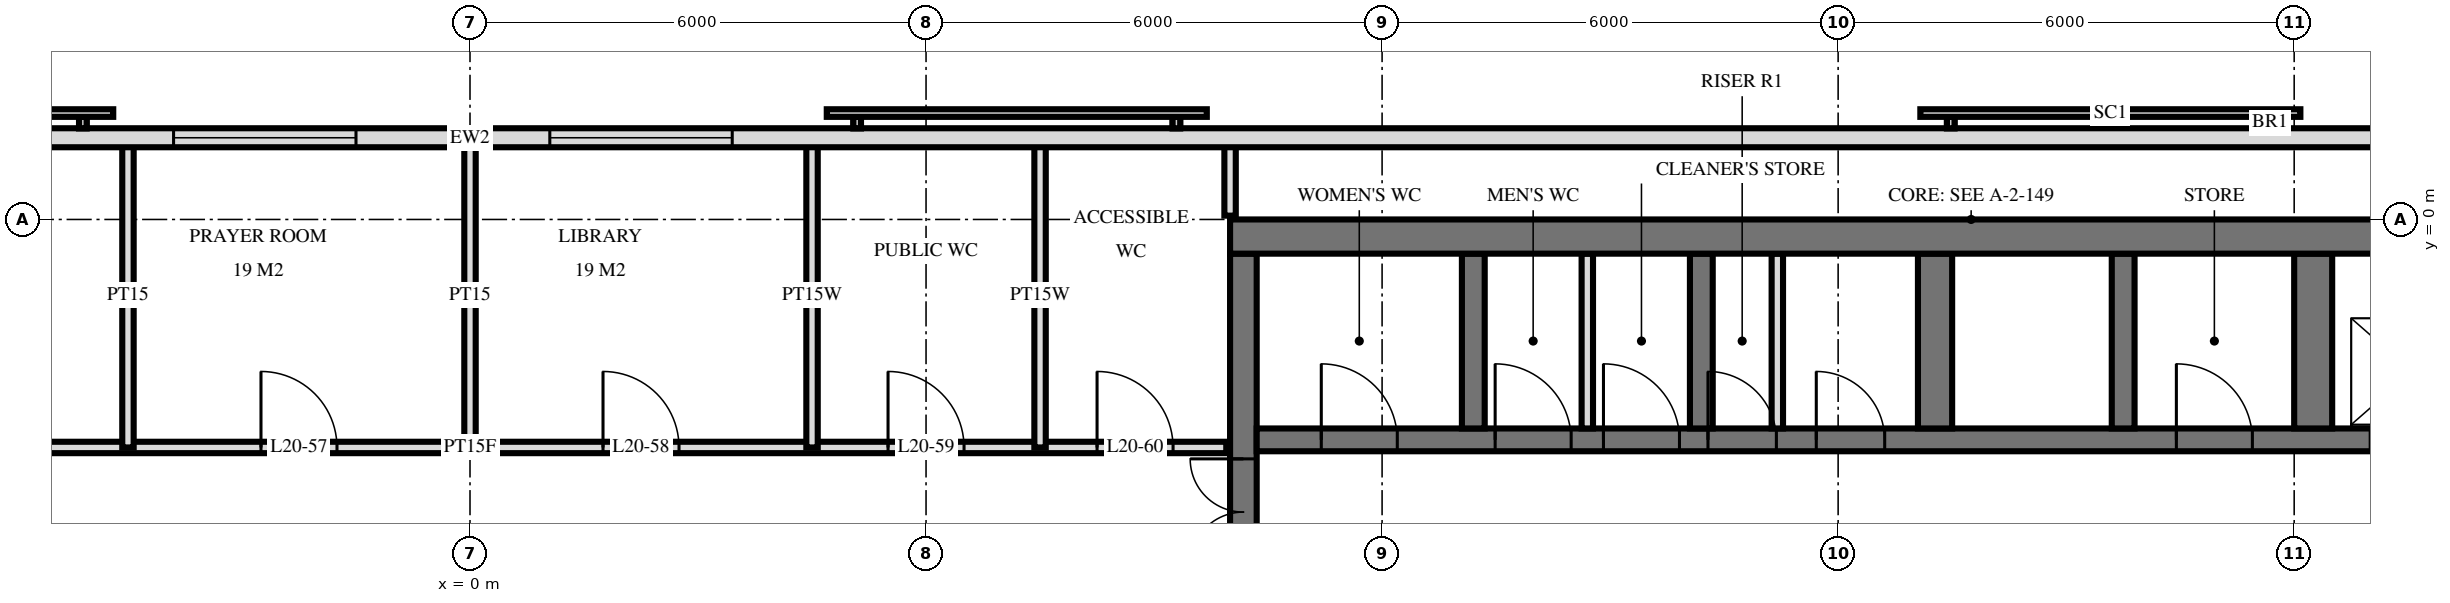
"""IFC4 building model, lengths in metres.
Left out: names, types, materials, properties, quantities, classifications, styles, units other than length and angle.
Written with IfcOpenShell. Run it as: python <this file> out.ifc"""

import sys

from ifc_helpers import new_model, si_unit, direction, frame, frame_2d, origin, place, context, subcontext, project, spatial, rectangle, extrude, element, fill, save


model = new_model("IFC4")
c1 = context("Model", 3, precision=1e-05, world=origin(), true_north=direction((0.0, 1.0)))
c2 = subcontext(c1, "Body", "Model", "MODEL_VIEW")
j1 = project(units=[si_unit("LENGTHUNIT", "METRE"), si_unit("PLANEANGLEUNIT", "RADIAN")], contexts=[c1])
p1 = place(None, origin())
s1 = spatial("IfcSite", under=j1, at=p1, CompositionType="ELEMENT")
p2 = place(p1, origin())
s2 = spatial("IfcBuilding", under=s1, at=p2, CompositionType="ELEMENT")
p3 = place(p2, frame((0.0, 0.0, 81.6)))
s3 = spatial("IfcBuildingStorey", under=s2, at=p3, CompositionType="ELEMENT", Elevation=81.6)
p4 = place(p3, frame((10.0, -0.225, 0.0), z_axis=(0.0, 0.0, 1.0), x_axis=(1.0, 0.0, 0.0)))
e1 = element("IfcWall", 1, at=p4, inside=s3, PredefinedType="SHEAR", context=c2, shape_type="SweptSolid", body=[
    extrude(rectangle(XDim=19.5, YDim=0.45, at=frame_2d((9.75, 0.0))), origin(), (0.0, 0.0, 1.0), 3.6),
])
p5 = place(p3, frame((10.175, -14.55, 0.0), z_axis=(0.0, 0.0, 1.0), x_axis=(0.0, 1.0, 0.0)))
e2 = element("IfcWall", 2, at=p5, inside=s3, PredefinedType="SHEAR", context=c2, shape_type="SweptSolid", body=[
    extrude(rectangle(XDim=14.1, YDim=0.35, at=frame_2d((7.05, 0.0))), origin(), (0.0, 0.0, 1.0), 3.6),
])
p6 = place(p5, frame((8.4, 0.0, 0.0)))
e3 = element("IfcOpeningElement", 3, at=p6, cuts=e2, PredefinedType="OPENING", context=c2, shape_type="SweptSolid", body=[
    extrude(rectangle(XDim=1.4, YDim=2.4, at=frame_2d((0.7, 1.2))), frame((0.0, 0.185, 0.0), z_axis=(0.0, -1.0, 0.0), x_axis=(1.0, 0.0, 0.0)), (0.0, 0.0, 1.0), 0.37),
])
p7 = place(p5, frame((10.0, 0.0, 0.0)))
e4 = element("IfcOpeningElement", 4, at=p7, cuts=e2, PredefinedType="OPENING", context=c2, shape_type="SweptSolid", body=[
    extrude(rectangle(XDim=1.4, YDim=2.4, at=frame_2d((0.7, 1.2))), frame((0.0, 0.185, 0.0), z_axis=(0.0, -1.0, 0.0), x_axis=(1.0, 0.0, 0.0)), (0.0, 0.0, 1.0), 0.37),
])
p8 = place(p5, frame((4.0, 0.0, 0.0)))
e5 = element("IfcOpeningElement", 5, at=p8, cuts=e2, PredefinedType="OPENING", context=c2, shape_type="SweptSolid", body=[
    extrude(rectangle(XDim=1.2, YDim=2.1, at=frame_2d((0.6, 1.05))), frame((0.0, 0.185, 0.0), z_axis=(0.0, -1.0, 0.0), x_axis=(1.0, 0.0, 0.0)), (0.0, 0.0, 1.0), 0.37),
])
p9 = place(p3, frame((10.35, -2.9, 0.0), z_axis=(0.0, 0.0, 1.0), x_axis=(1.0, 0.0, 0.0)))
e6 = element("IfcWall", 6, at=p9, inside=s3, PredefinedType="SHEAR", context=c2, shape_type="SweptSolid", body=[
    extrude(rectangle(XDim=18.7, YDim=0.3, at=frame_2d((9.35, 0.0))), origin(), (0.0, 0.0, 1.0), 3.6),
])
p10 = place(p9, frame((14.65, 0.0, 0.0)))
e7 = element("IfcOpeningElement", 7, at=p10, cuts=e6, PredefinedType="OPENING", context=c2, shape_type="SweptSolid", body=[
    extrude(rectangle(XDim=1.1, YDim=2.1, at=frame_2d((0.55, 1.05))), frame((0.0, 0.16, 0.0), z_axis=(0.0, -1.0, 0.0), x_axis=(1.0, 0.0, 0.0)), (0.0, 0.0, 1.0), 0.32),
])
p11 = place(p9, frame((17.05, 0.0, 0.0)))
e8 = element("IfcOpeningElement", 8, at=p11, cuts=e6, PredefinedType="OPENING", context=c2, shape_type="SweptSolid", body=[
    extrude(rectangle(XDim=1.1, YDim=2.1, at=frame_2d((0.55, 1.05))), frame((0.0, 0.16, 0.0), z_axis=(0.0, -1.0, 0.0), x_axis=(1.0, 0.0, 0.0)), (0.0, 0.0, 1.0), 0.32),
])
p12 = place(p9, frame((5.938, 0.0, 0.0)))
e9 = element("IfcOpeningElement", 9, at=p12, cuts=e6, PredefinedType="OPENING", context=c2, shape_type="SweptSolid", body=[
    extrude(rectangle(XDim=0.9, YDim=2.1, at=frame_2d((0.45, 1.05))), frame((0.0, 0.16, 0.0), z_axis=(0.0, -1.0, 0.0), x_axis=(1.0, 0.0, 0.0)), (0.0, 0.0, 1.0), 0.32),
])
p13 = place(p9, frame((7.363, 0.0, 0.0)))
e10 = element("IfcOpeningElement", 10, at=p13, cuts=e6, PredefinedType="OPENING", context=c2, shape_type="SweptSolid", body=[
    extrude(rectangle(XDim=0.9, YDim=2.1, at=frame_2d((0.45, 1.05))), frame((0.0, 0.16, 0.0), z_axis=(0.0, -1.0, 0.0), x_axis=(1.0, 0.0, 0.0)), (0.0, 0.0, 1.0), 0.32),
])
p14 = place(p9, frame((0.85, 0.0, 0.0)))
e11 = element("IfcOpeningElement", 11, at=p14, cuts=e6, PredefinedType="OPENING", context=c2, shape_type="SweptSolid", body=[
    extrude(rectangle(XDim=1.0, YDim=2.1, at=frame_2d((0.5, 1.05))), frame((0.0, 0.16, 0.0), z_axis=(0.0, -1.0, 0.0), x_axis=(1.0, 0.0, 0.0)), (0.0, 0.0, 1.0), 0.32),
])
p15 = place(p9, frame((3.137, 0.0, 0.0)))
e12 = element("IfcOpeningElement", 12, at=p15, cuts=e6, PredefinedType="OPENING", context=c2, shape_type="SweptSolid", body=[
    extrude(rectangle(XDim=1.0, YDim=2.1, at=frame_2d((0.5, 1.05))), frame((0.0, 0.16, 0.0), z_axis=(0.0, -1.0, 0.0), x_axis=(1.0, 0.0, 0.0)), (0.0, 0.0, 1.0), 0.32),
])
p16 = place(p9, frame((4.562, 0.0, 0.0)))
e13 = element("IfcOpeningElement", 13, at=p16, cuts=e6, PredefinedType="OPENING", context=c2, shape_type="SweptSolid", body=[
    extrude(rectangle(XDim=1.0, YDim=2.1, at=frame_2d((0.5, 1.05))), frame((0.0, 0.16, 0.0), z_axis=(0.0, -1.0, 0.0), x_axis=(1.0, 0.0, 0.0)), (0.0, 0.0, 1.0), 0.32),
])
p17 = place(p9, frame((12.1, 0.0, 0.0)))
e14 = element("IfcOpeningElement", 14, at=p17, cuts=e6, PredefinedType="OPENING", context=c2, shape_type="SweptSolid", body=[
    extrude(rectangle(XDim=1.0, YDim=2.1, at=frame_2d((0.5, 1.05))), frame((0.0, 0.16, 0.0), z_axis=(0.0, -1.0, 0.0), x_axis=(1.0, 0.0, 0.0)), (0.0, 0.0, 1.0), 0.32),
])
for number, where, z_axis, x_axis in (
    (15, (13.2, -2.75, 0.0), (0.0, 0.0, 1.0), (0.0, 1.0, 0.0)),
    (16, (16.2, -2.75, 0.0), (0.0, 0.0, 1.0), (0.0, 1.0, 0.0)),
):
    element("IfcWall", number, at=place(p3, frame(where, z_axis=z_axis, x_axis=x_axis)), inside=s3, PredefinedType="SHEAR", context=c2, shape_type="SweptSolid", body=[
        extrude(rectangle(XDim=2.3, YDim=0.3, at=frame_2d((1.15, 0.0))), origin(), (0.0, 0.0, 1.0), 3.6),
    ])
p18 = place(p3, frame((19.275, -2.75, 0.0), z_axis=(0.0, 0.0, 1.0), x_axis=(0.0, 1.0, 0.0)))
e17 = element("IfcWall", 17, at=p18, inside=s3, PredefinedType="SHEAR", context=c2, shape_type="SweptSolid", body=[
    extrude(rectangle(XDim=2.3, YDim=0.45, at=frame_2d((1.15, 0.0))), origin(), (0.0, 0.0, 1.0), 3.6),
])
p19 = place(p3, frame((21.75, -2.75, 0.0), z_axis=(0.0, 0.0, 1.0), x_axis=(0.0, 1.0, 0.0)))
e18 = element("IfcWall", 18, at=p19, inside=s3, PredefinedType="SHEAR", context=c2, shape_type="SweptSolid", body=[
    extrude(rectangle(XDim=2.3, YDim=0.3, at=frame_2d((1.15, 0.0))), origin(), (0.0, 0.0, 1.0), 3.6),
])
p20 = place(p3, frame((24.25, -2.75, 0.0), z_axis=(0.0, 0.0, 1.0), x_axis=(0.0, 1.0, 0.0)))
e19 = element("IfcWall", 19, at=p20, inside=s3, PredefinedType="SHEAR", context=c2, shape_type="SweptSolid", body=[
    extrude(rectangle(XDim=2.3, YDim=0.5, at=frame_2d((1.15, 0.0))), origin(), (0.0, 0.0, 1.0), 3.6),
])
p21 = place(p3, frame((28.775, 1.075, 0.0), z_axis=(0.0, 0.0, 1.0), x_axis=(-1.0, 0.0, 0.0)))
e20 = element("IfcWall", 20, at=p21, inside=s3, PredefinedType="SOLIDWALL", context=c2, shape_type="SweptSolid", body=[
    extrude(rectangle(XDim=57.551, YDim=0.25, at=frame_2d((28.775, 0.0))), origin(), (0.0, 0.0, 1.0), 3.32),
])
p22 = place(p21, frame((25.325, 0.0, 0.3)))
e21 = element("IfcOpeningElement", 21, at=p22, cuts=e20, PredefinedType="OPENING", context=c2, shape_type="SweptSolid", body=[
    extrude(rectangle(XDim=2.4, YDim=2.1, at=frame_2d((1.2, 1.05))), frame((0.0, 0.135, 0.0), z_axis=(0.0, -1.0, 0.0), x_axis=(1.0, 0.0, 0.0)), (0.0, 0.0, 1.0), 0.27),
])
p23 = place(p21, frame((30.275, 0.0, 0.3)))
e22 = element("IfcOpeningElement", 22, at=p23, cuts=e20, PredefinedType="OPENING", context=c2, shape_type="SweptSolid", body=[
    extrude(rectangle(XDim=2.4, YDim=2.1, at=frame_2d((1.2, 1.05))), frame((0.0, 0.135, 0.0), z_axis=(0.0, -1.0, 0.0), x_axis=(1.0, 0.0, 0.0)), (0.0, 0.0, 1.0), 0.27),
])
p24 = place(p21, frame((34.825, 0.0, 0.3)))
e23 = element("IfcOpeningElement", 23, at=p24, cuts=e20, PredefinedType="OPENING", context=c2, shape_type="SweptSolid", body=[
    extrude(rectangle(XDim=2.4, YDim=2.1, at=frame_2d((1.2, 1.05))), frame((0.0, 0.135, 0.0), z_axis=(0.0, -1.0, 0.0), x_axis=(1.0, 0.0, 0.0)), (0.0, 0.0, 1.0), 0.27),
])
for number, where, z_axis, x_axis in (
    (24, (17.2, -2.75, 0.0), (0.0, 0.0, 1.0), (0.0, 1.0, 0.0)),
    (25, (14.7, -2.75, 0.0), (0.0, 0.0, 1.0), (0.0, 1.0, 0.0)),
):
    element("IfcWall", number, at=place(p3, frame(where, z_axis=z_axis, x_axis=x_axis)), inside=s3, PredefinedType="PARTITIONING", context=c2, shape_type="SweptSolid", body=[
        extrude(rectangle(XDim=2.3, YDim=0.15, at=frame_2d((1.15, 0.0))), origin(), (0.0, 0.0, 1.0), 3.3),
    ])
p25 = place(p3, frame((10.0, 0.05, 0.0), z_axis=(0.0, 0.0, 1.0), x_axis=(0.0, 1.0, 0.0)))
e26 = element("IfcWall", 26, at=p25, inside=s3, PredefinedType="PLUMBINGWALL", context=c2, shape_type="SweptSolid", body=[
    extrude(rectangle(XDim=0.97, YDim=0.15, at=frame_2d((0.485, 0.0))), origin(), (0.0, 0.0, 1.0), 3.32),
])
for number, where, z_axis, x_axis in (
    (27, (7.5, -3.0, 0.0), (0.0, 0.0, 1.0), (0.0, 1.0, 0.0)),
    (28, (4.5, -3.0, 0.0), (0.0, 0.0, 1.0), (0.0, 1.0, 0.0)),
):
    element("IfcWall", number, at=place(p3, frame(where, z_axis=z_axis, x_axis=x_axis)), inside=s3, PredefinedType="PLUMBINGWALL", context=c2, shape_type="SweptSolid", body=[
        extrude(rectangle(XDim=4.02, YDim=0.15, at=frame_2d((2.01, 0.0))), origin(), (0.0, 0.0, 1.0), 3.32),
    ])
for number, where, z_axis, x_axis in (
    (29, (0.0, -3.0, 0.0), (0.0, 0.0, 1.0), (0.0, 1.0, 0.0)),
    (30, (-4.5, -3.0, 0.0), (0.0, 0.0, 1.0), (0.0, 1.0, 0.0)),
):
    element("IfcWall", number, at=place(p3, frame(where, z_axis=z_axis, x_axis=x_axis)), inside=s3, PredefinedType="PARTITIONING", context=c2, shape_type="SweptSolid", body=[
        extrude(rectangle(XDim=4.02, YDim=0.15, at=frame_2d((2.01, 0.0))), origin(), (0.0, 0.0, 1.0), 3.32),
    ])
p26 = place(p3, frame((-9.95, -3.0, 0.0), z_axis=(0.0, 0.0, 1.0), x_axis=(1.0, 0.0, 0.0)))
e31 = element("IfcWall", 31, at=p26, inside=s3, PredefinedType="PARTITIONING", context=c2, shape_type="SweptSolid", body=[
    extrude(rectangle(XDim=19.9, YDim=0.15, at=frame_2d((9.95, 0.0))), origin(), (0.0, 0.0, 1.0), 3.32),
])
p27 = place(p26, frame((2.2, 0.0, 0.0)))
e32 = element("IfcOpeningElement", 32, at=p27, cuts=e31, PredefinedType="OPENING", context=c2, shape_type="SweptSolid", body=[
    extrude(rectangle(XDim=1.0, YDim=2.1, at=frame_2d((0.5, 1.05))), frame((0.0, 0.085, 0.0), z_axis=(0.0, -1.0, 0.0), x_axis=(1.0, 0.0, 0.0)), (0.0, 0.0, 1.0), 0.17),
])
p28 = place(p26, frame((7.2, 0.0, 0.0)))
e33 = element("IfcOpeningElement", 33, at=p28, cuts=e31, PredefinedType="OPENING", context=c2, shape_type="SweptSolid", body=[
    extrude(rectangle(XDim=1.0, YDim=2.1, at=frame_2d((0.5, 1.05))), frame((0.0, 0.085, 0.0), z_axis=(0.0, -1.0, 0.0), x_axis=(1.0, 0.0, 0.0)), (0.0, 0.0, 1.0), 0.17),
])
p29 = place(p26, frame((11.7, 0.0, 0.0)))
e34 = element("IfcOpeningElement", 34, at=p29, cuts=e31, PredefinedType="OPENING", context=c2, shape_type="SweptSolid", body=[
    extrude(rectangle(XDim=1.0, YDim=2.1, at=frame_2d((0.5, 1.05))), frame((0.0, 0.085, 0.0), z_axis=(0.0, -1.0, 0.0), x_axis=(1.0, 0.0, 0.0)), (0.0, 0.0, 1.0), 0.17),
])
p30 = place(p26, frame((15.45, 0.0, 0.0)))
e35 = element("IfcOpeningElement", 35, at=p30, cuts=e31, PredefinedType="OPENING", context=c2, shape_type="SweptSolid", body=[
    extrude(rectangle(XDim=1.0, YDim=2.1, at=frame_2d((0.5, 1.05))), frame((0.0, 0.085, 0.0), z_axis=(0.0, -1.0, 0.0), x_axis=(1.0, 0.0, 0.0)), (0.0, 0.0, 1.0), 0.17),
])
p31 = place(p26, frame((18.2, 0.0, 0.0)))
e36 = element("IfcOpeningElement", 36, at=p31, cuts=e31, PredefinedType="OPENING", context=c2, shape_type="SweptSolid", body=[
    extrude(rectangle(XDim=1.0, YDim=2.1, at=frame_2d((0.5, 1.05))), frame((0.0, 0.085, 0.0), z_axis=(0.0, -1.0, 0.0), x_axis=(1.0, 0.0, 0.0)), (0.0, 0.0, 1.0), 0.17),
])
p32 = place(p22, origin())
e37 = element("IfcWindow", 37, at=p32, inside=s3, PartitioningType="SINGLE_PANEL", PredefinedType="WINDOW", context=c2, shape_type="SweptSolid", body=[
    extrude(rectangle(XDim=2.4, YDim=2.1, at=frame_2d((1.2, 1.05))), frame((0.0, 0.03, 0.0), z_axis=(0.0, -1.0, 0.0), x_axis=(1.0, 0.0, 0.0)), (0.0, 0.0, 1.0), 0.06),
])
fill(e21, e37)
p33 = place(p23, origin())
e38 = element("IfcWindow", 38, at=p33, inside=s3, PartitioningType="SINGLE_PANEL", PredefinedType="WINDOW", context=c2, shape_type="SweptSolid", body=[
    extrude(rectangle(XDim=2.4, YDim=2.1, at=frame_2d((1.2, 1.05))), frame((0.0, 0.03, 0.0), z_axis=(0.0, -1.0, 0.0), x_axis=(1.0, 0.0, 0.0)), (0.0, 0.0, 1.0), 0.06),
])
fill(e22, e38)
p34 = place(p7, origin())
e39 = element("IfcDoor", 39, at=p34, inside=s3, OperationType="DOUBLE_DOOR_SINGLE_SWING", PredefinedType="DOOR", context=c2, shape_type="SweptSolid", body=[
    extrude(rectangle(XDim=1.4, YDim=2.4, at=frame_2d((0.7, 1.2))), frame((0.0, 0.025, 0.0), z_axis=(0.0, -1.0, 0.0), x_axis=(1.0, 0.0, 0.0)), (0.0, 0.0, 1.0), 0.05),
])
fill(e4, e39)
p35 = place(p12, origin())
e40 = element("IfcDoor", 40, at=p35, inside=s3, OperationType="SINGLE_SWING_RIGHT", PredefinedType="DOOR", context=c2, shape_type="SweptSolid", body=[
    extrude(rectangle(XDim=0.9, YDim=2.1, at=frame_2d((0.45, 1.05))), frame((0.0, 0.025, 0.0), z_axis=(0.0, -1.0, 0.0), x_axis=(1.0, 0.0, 0.0)), (0.0, 0.0, 1.0), 0.05),
])
fill(e9, e40)
p36 = place(p13, origin())
e41 = element("IfcDoor", 41, at=p36, inside=s3, OperationType="SINGLE_SWING_RIGHT", PredefinedType="DOOR", context=c2, shape_type="SweptSolid", body=[
    extrude(rectangle(XDim=0.9, YDim=2.1, at=frame_2d((0.45, 1.05))), frame((0.0, 0.025, 0.0), z_axis=(0.0, -1.0, 0.0), x_axis=(1.0, 0.0, 0.0)), (0.0, 0.0, 1.0), 0.05),
])
fill(e10, e41)
p37 = place(p14, origin())
e42 = element("IfcDoor", 42, at=p37, inside=s3, OperationType="SINGLE_SWING_RIGHT", PredefinedType="DOOR", context=c2, shape_type="SweptSolid", body=[
    extrude(rectangle(XDim=1.0, YDim=2.1, at=frame_2d((0.5, 1.05))), frame((0.0, 0.025, 0.0), z_axis=(0.0, -1.0, 0.0), x_axis=(1.0, 0.0, 0.0)), (0.0, 0.0, 1.0), 0.05),
])
fill(e11, e42)
p38 = place(p15, origin())
e43 = element("IfcDoor", 43, at=p38, inside=s3, OperationType="SINGLE_SWING_RIGHT", PredefinedType="DOOR", context=c2, shape_type="SweptSolid", body=[
    extrude(rectangle(XDim=1.0, YDim=2.1, at=frame_2d((0.5, 1.05))), frame((0.0, 0.025, 0.0), z_axis=(0.0, -1.0, 0.0), x_axis=(1.0, 0.0, 0.0)), (0.0, 0.0, 1.0), 0.05),
])
fill(e12, e43)
p39 = place(p16, origin())
e44 = element("IfcDoor", 44, at=p39, inside=s3, OperationType="SINGLE_SWING_RIGHT", PredefinedType="DOOR", context=c2, shape_type="SweptSolid", body=[
    extrude(rectangle(XDim=1.0, YDim=2.1, at=frame_2d((0.5, 1.05))), frame((0.0, 0.025, 0.0), z_axis=(0.0, -1.0, 0.0), x_axis=(1.0, 0.0, 0.0)), (0.0, 0.0, 1.0), 0.05),
])
fill(e13, e44)
p40 = place(p17, origin())
e45 = element("IfcDoor", 45, at=p40, inside=s3, OperationType="SINGLE_SWING_RIGHT", PredefinedType="DOOR", context=c2, shape_type="SweptSolid", body=[
    extrude(rectangle(XDim=1.0, YDim=2.1, at=frame_2d((0.5, 1.05))), frame((0.0, 0.025, 0.0), z_axis=(0.0, -1.0, 0.0), x_axis=(1.0, 0.0, 0.0)), (0.0, 0.0, 1.0), 0.05),
])
fill(e14, e45)
p41 = place(p28, origin())
e46 = element("IfcDoor", 46, at=p41, inside=s3, OperationType="SINGLE_SWING_RIGHT", PredefinedType="DOOR", context=c2, shape_type="SweptSolid", body=[
    extrude(rectangle(XDim=1.0, YDim=2.1, at=frame_2d((0.5, 1.05))), frame((0.0, 0.025, 0.0), z_axis=(0.0, -1.0, 0.0), x_axis=(1.0, 0.0, 0.0)), (0.0, 0.0, 1.0), 0.05),
])
fill(e33, e46)
p42 = place(p29, origin())
e47 = element("IfcDoor", 47, at=p42, inside=s3, OperationType="SINGLE_SWING_RIGHT", PredefinedType="DOOR", context=c2, shape_type="SweptSolid", body=[
    extrude(rectangle(XDim=1.0, YDim=2.1, at=frame_2d((0.5, 1.05))), frame((0.0, 0.025, 0.0), z_axis=(0.0, -1.0, 0.0), x_axis=(1.0, 0.0, 0.0)), (0.0, 0.0, 1.0), 0.05),
])
fill(e34, e47)
p43 = place(p30, origin())
e48 = element("IfcDoor", 48, at=p43, inside=s3, OperationType="SINGLE_SWING_RIGHT", PredefinedType="DOOR", context=c2, shape_type="SweptSolid", body=[
    extrude(rectangle(XDim=1.0, YDim=2.1, at=frame_2d((0.5, 1.05))), frame((0.0, 0.025, 0.0), z_axis=(0.0, -1.0, 0.0), x_axis=(1.0, 0.0, 0.0)), (0.0, 0.0, 1.0), 0.05),
])
fill(e35, e48)
p44 = place(p31, origin())
e49 = element("IfcDoor", 49, at=p44, inside=s3, OperationType="SINGLE_SWING_RIGHT", PredefinedType="DOOR", context=c2, shape_type="SweptSolid", body=[
    extrude(rectangle(XDim=1.0, YDim=2.1, at=frame_2d((0.5, 1.05))), frame((0.0, 0.025, 0.0), z_axis=(0.0, -1.0, 0.0), x_axis=(1.0, 0.0, 0.0)), (0.0, 0.0, 1.0), 0.05),
])
fill(e36, e49)
save(model, sys.argv[1])
